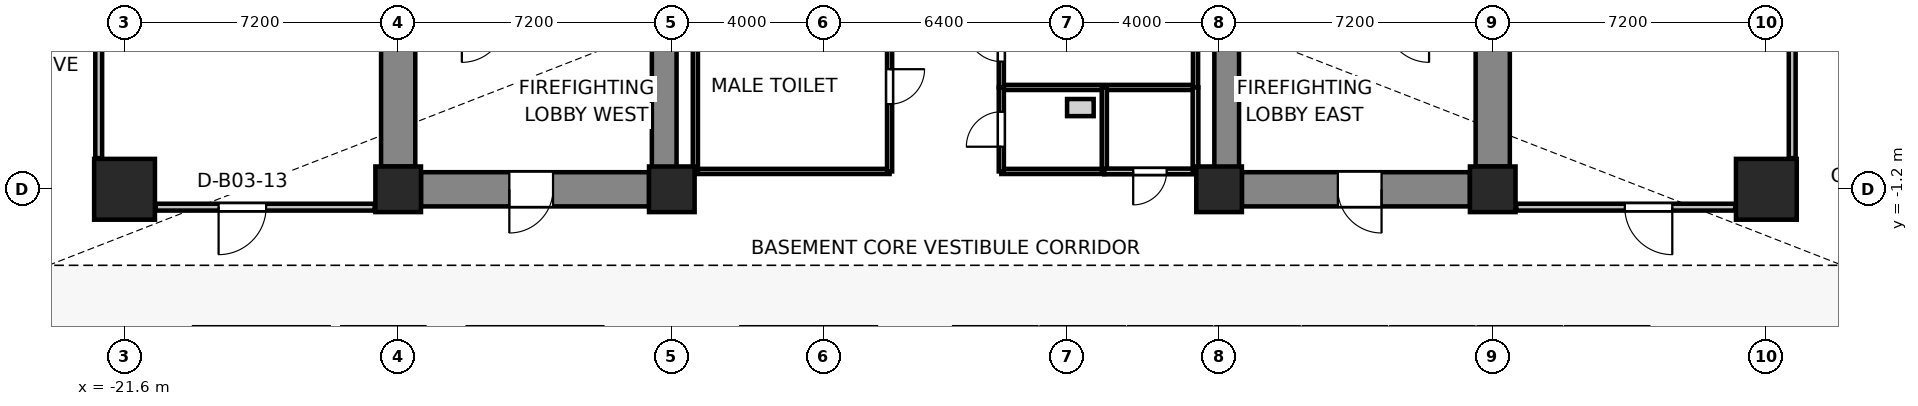
"""IFC4 building model, lengths in metres.
Left out: names, types, materials, properties, quantities, classifications, styles, units other than length and angle.
Written with IfcOpenShell. Run it as: python <this file> out.ifc"""

import sys

from ifc_helpers import new_model, si_unit, direction, frame, frame_2d, origin, origin_2d, place, context, subcontext, project, spatial, rectangle, extrude, source, transform, mapped, element, fill, save


model = new_model("IFC4")
c1 = context("Model", 3, precision=1e-05, world=origin(), true_north=direction((0.0, 1.0)))
c2 = subcontext(c1, "Body", "Model", "MODEL_VIEW")
j1 = project(units=[si_unit("LENGTHUNIT", "METRE"), si_unit("PLANEANGLEUNIT", "RADIAN")], contexts=[c1])
p1 = place(None, origin())
s1 = spatial("IfcSite", under=j1, at=p1, CompositionType="ELEMENT")
p2 = place(p1, origin())
s2 = spatial("IfcBuilding", under=s1, at=p2, CompositionType="ELEMENT")
p3 = place(p2, frame((0.0, 0.0, -13.2)))
s3 = spatial("IfcBuildingStorey", under=s2, at=p3, CompositionType="ELEMENT", Elevation=-13.2)
for number, where, z_axis, x_axis in (
    (1, (-14.4, -1.2, 0.0), (0.0, 0.0, 1.0), (1.0, 0.0, 0.0)),
    (2, (-7.2, -1.2, 0.0), (0.0, 0.0, 1.0), (1.0, 0.0, 0.0)),
    (3, (7.2, -1.2, 0.0), (0.0, 0.0, 1.0), (1.0, 0.0, 0.0)),
    (4, (14.4, -1.2, 0.0), (0.0, 0.0, 1.0), (1.0, 0.0, 0.0)),
):
    element("IfcColumn", number, at=place(p3, frame(where, z_axis=z_axis, x_axis=x_axis)), inside=s3, PredefinedType="COLUMN", context=c2, shape_type="SweptSolid", body=[
        extrude(rectangle(XDim=1.2, YDim=1.2, at=origin_2d()), origin(), (0.0, 0.0, 1.0), 4.4),
    ])
for number, where, z_axis, x_axis in (
    (5, (-21.6, -1.2, 0.0), (0.0, 0.0, 1.0), (1.0, 0.0, 0.0)),
    (6, (21.6, -1.2, 0.0), (0.0, 0.0, 1.0), (1.0, 0.0, 0.0)),
):
    element("IfcColumn", number, at=place(p3, frame(where, z_axis=z_axis, x_axis=x_axis)), inside=s3, PredefinedType="COLUMN", context=c2, shape_type="SweptSolid", body=[
        extrude(rectangle(XDim=1.6, YDim=1.6, at=origin_2d()), origin(), (0.0, 0.0, 1.0), 4.4),
    ])
for number, where, z_axis, x_axis in (
    (7, (-14.4, -0.6, 0.0), (0.0, 0.0, 1.0), (0.0, 1.0, 0.0)),
    (8, (14.4, -0.6, 0.0), (0.0, 0.0, 1.0), (0.0, 1.0, 0.0)),
):
    element("IfcWall", number, at=place(p3, frame(where, z_axis=z_axis, x_axis=x_axis)), inside=s3, PredefinedType="SHEAR", context=c2, shape_type="SweptSolid", body=[
        extrude(rectangle(XDim=6.6, YDim=0.9, at=frame_2d((3.3, 0.0))), origin(), (0.0, 0.0, 1.0), 4.12),
    ])
p4 = place(p3, frame((-7.8, -1.2, 0.0), z_axis=(0.0, 0.0, 1.0), x_axis=(-1.0, 0.0, 0.0)))
e9 = element("IfcWall", 9, at=p4, inside=s3, PredefinedType="SHEAR", context=c2, shape_type="SweptSolid", body=[
    extrude(rectangle(XDim=6.0, YDim=0.9, at=frame_2d((3.0, 0.0))), origin(), (0.0, 0.0, 1.0), 4.12),
])
p5 = place(p4, frame((2.525, 0.0, 0.0)))
e10 = element("IfcOpeningElement", 10, at=p5, cuts=e9, PredefinedType="OPENING", context=c2, shape_type="SweptSolid", body=[
    extrude(rectangle(XDim=1.15, YDim=2.15, at=frame_2d((0.575, 1.075))), frame((0.0, 0.46, 0.0), z_axis=(0.0, -1.0, 0.0), x_axis=(1.0, 0.0, 0.0)), (0.0, 0.0, 1.0), 0.92),
])
p6 = place(p3, frame((13.8, -1.2, 0.0), z_axis=(0.0, 0.0, 1.0), x_axis=(-1.0, 0.0, 0.0)))
e11 = element("IfcWall", 11, at=p6, inside=s3, PredefinedType="SHEAR", context=c2, shape_type="SweptSolid", body=[
    extrude(rectangle(XDim=6.0, YDim=0.9, at=frame_2d((3.0, 0.0))), origin(), (0.0, 0.0, 1.0), 4.12),
])
p7 = place(p6, frame((2.325, 0.0, 0.0)))
e12 = element("IfcOpeningElement", 12, at=p7, cuts=e11, PredefinedType="OPENING", context=c2, shape_type="SweptSolid", body=[
    extrude(rectangle(XDim=1.15, YDim=2.15, at=frame_2d((0.575, 1.075))), frame((0.0, 0.46, 0.0), z_axis=(0.0, -1.0, 0.0), x_axis=(1.0, 0.0, 0.0)), (0.0, 0.0, 1.0), 0.92),
])
for number, where, z_axis, x_axis in (
    (13, (-7.4, -0.75, 0.0), (0.0, 0.0, 1.0), (0.0, 1.0, 0.0)),
    (14, (7.4, -0.75, 0.0), (0.0, 0.0, 1.0), (0.0, 1.0, 0.0)),
):
    element("IfcWall", number, at=place(p3, frame(where, z_axis=z_axis, x_axis=x_axis)), inside=s3, PredefinedType="SHEAR", context=c2, shape_type="SweptSolid", body=[
        extrude(rectangle(XDim=4.0, YDim=0.65, at=frame_2d((2.0, 0.0))), origin(), (0.0, 0.0, 1.0), 4.12),
    ])
p8 = place(p3, frame((-1.47, -0.73, 0.0), z_axis=(0.0, 0.0, 1.0), x_axis=(-1.0, 0.0, 0.0)))
e15 = element("IfcWall", 15, at=p8, inside=s3, PredefinedType="PARTITIONING", context=c2, shape_type="SweptSolid", body=[
    extrude(rectangle(XDim=5.11, YDim=0.135, at=frame_2d((2.555, 0.0))), origin(), (0.0, 0.0, 1.0), 4.12),
])
p9 = place(p3, frame((-6.58, -0.73, 0.0), z_axis=(0.0, 0.0, 1.0), x_axis=(0.0, 1.0, 0.0)))
e16 = element("IfcWall", 16, at=p9, inside=s3, PredefinedType="PARTITIONING", context=c2, shape_type="SweptSolid", body=[
    extrude(rectangle(XDim=4.49, YDim=0.135, at=frame_2d((2.245, 0.0))), origin(), (0.0, 0.0, 1.0), 3.493),
])
p10 = place(p3, frame((-1.47, 3.76, 0.0), z_axis=(0.0, 0.0, 1.0), x_axis=(0.0, -1.0, 0.0)))
e17 = element("IfcWall", 17, at=p10, inside=s3, PredefinedType="PARTITIONING", context=c2, shape_type="SweptSolid", body=[
    extrude(rectangle(XDim=4.49, YDim=0.135, at=frame_2d((2.245, 0.0))), origin(), (0.0, 0.0, 1.0), 3.493),
])
p11 = place(p10, frame((1.8, 0.0, 0.0)))
e18 = element("IfcOpeningElement", 18, at=p11, cuts=e17, PredefinedType="OPENING", context=c2, shape_type="SweptSolid", body=[
    extrude(rectangle(XDim=0.92, YDim=2.1, at=frame_2d((0.46, 1.05))), frame((0.0, 0.077, 0.0), z_axis=(0.0, -1.0, 0.0), x_axis=(1.0, 0.0, 0.0)), (0.0, 0.0, 1.0), 0.155),
])
p12 = place(p3, frame((6.58, 1.48, 0.0), z_axis=(0.0, 0.0, 1.0), x_axis=(-1.0, 0.0, 0.0)))
e19 = element("IfcWall", 19, at=p12, inside=s3, PredefinedType="PARTITIONING", context=c2, shape_type="SweptSolid", body=[
    extrude(rectangle(XDim=5.11, YDim=0.135, at=frame_2d((2.555, 0.0))), origin(), (0.0, 0.0, 1.0), 4.12),
])
p13 = place(p3, frame((1.47, 1.48, 0.0), z_axis=(0.0, 0.0, 1.0), x_axis=(0.0, 1.0, 0.0)))
e20 = element("IfcWall", 20, at=p13, inside=s3, PredefinedType="PARTITIONING", context=c2, shape_type="SweptSolid", body=[
    extrude(rectangle(XDim=2.28, YDim=0.135, at=frame_2d((1.14, 0.0))), origin(), (0.0, 0.0, 1.0), 3.493),
])
p14 = place(p13, frame((0.68, 0.0, 0.0)))
e21 = element("IfcOpeningElement", 21, at=p14, cuts=e20, PredefinedType="OPENING", context=c2, shape_type="SweptSolid", body=[
    extrude(rectangle(XDim=0.92, YDim=2.1, at=frame_2d((0.46, 1.05))), frame((0.0, 0.077, 0.0), z_axis=(0.0, -1.0, 0.0), x_axis=(1.0, 0.0, 0.0)), (0.0, 0.0, 1.0), 0.155),
])
p15 = place(p3, frame((6.58, 3.76, 0.0), z_axis=(0.0, 0.0, 1.0), x_axis=(0.0, -1.0, 0.0)))
e22 = element("IfcWall", 22, at=p15, inside=s3, PredefinedType="PARTITIONING", context=c2, shape_type="SweptSolid", body=[
    extrude(rectangle(XDim=2.28, YDim=0.135, at=frame_2d((1.14, 0.0))), origin(), (0.0, 0.0, 1.0), 3.493),
])
p16 = place(p3, frame((4.18, -0.73, 0.0), z_axis=(0.0, 0.0, 1.0), x_axis=(-1.0, 0.0, 0.0)))
e23 = element("IfcWall", 23, at=p16, inside=s3, PredefinedType="PARTITIONING", context=c2, shape_type="SweptSolid", body=[
    extrude(rectangle(XDim=2.71, YDim=0.135, at=frame_2d((1.355, 0.0))), origin(), (0.0, 0.0, 1.0), 4.12),
])
p17 = place(p3, frame((1.47, -0.73, 0.0), z_axis=(0.0, 0.0, 1.0), x_axis=(0.0, 1.0, 0.0)))
e24 = element("IfcWall", 24, at=p17, inside=s3, PredefinedType="PARTITIONING", context=c2, shape_type="SweptSolid", body=[
    extrude(rectangle(XDim=2.21, YDim=0.135, at=frame_2d((1.105, 0.0))), origin(), (0.0, 0.0, 1.0), 4.12),
])
p18 = place(p17, frame((0.65, 0.0, 0.0)))
e25 = element("IfcOpeningElement", 25, at=p18, cuts=e24, PredefinedType="OPENING", context=c2, shape_type="SweptSolid", body=[
    extrude(rectangle(XDim=0.92, YDim=2.1, at=frame_2d((0.46, 1.05))), frame((0.0, 0.077, 0.0), z_axis=(0.0, -1.0, 0.0), x_axis=(1.0, 0.0, 0.0)), (0.0, 0.0, 1.0), 0.155),
])
p19 = place(p3, frame((4.18, 1.48, 0.0), z_axis=(0.0, 0.0, 1.0), x_axis=(0.0, -1.0, 0.0)))
e26 = element("IfcWall", 26, at=p19, inside=s3, PredefinedType="PARTITIONING", context=c2, shape_type="SweptSolid", body=[
    extrude(rectangle(XDim=2.21, YDim=0.135, at=frame_2d((1.105, 0.0))), origin(), (0.0, 0.0, 1.0), 4.12),
])
p20 = place(p3, frame((6.58, -0.73, 0.0), z_axis=(0.0, 0.0, 1.0), x_axis=(-1.0, 0.0, 0.0)))
e27 = element("IfcWall", 27, at=p20, inside=s3, PredefinedType="PARTITIONING", context=c2, shape_type="SweptSolid", body=[
    extrude(rectangle(XDim=2.4, YDim=0.15, at=frame_2d((1.2, 0.0))), origin(), (0.0, 0.0, 1.0), 4.12),
])
p21 = place(p20, frame((0.76, 0.0, 0.0)))
e28 = element("IfcOpeningElement", 28, at=p21, cuts=e27, PredefinedType="OPENING", context=c2, shape_type="SweptSolid", body=[
    extrude(rectangle(XDim=0.88, YDim=2.1, at=frame_2d((0.44, 1.05))), frame((0.0, 0.085, 0.0), z_axis=(0.0, -1.0, 0.0), x_axis=(1.0, 0.0, 0.0)), (0.0, 0.0, 1.0), 0.17),
])
p22 = place(p3, frame((6.58, 1.48, 0.0), z_axis=(0.0, 0.0, 1.0), x_axis=(0.0, -1.0, 0.0)))
e29 = element("IfcWall", 29, at=p22, inside=s3, PredefinedType="PARTITIONING", context=c2, shape_type="SweptSolid", body=[
    extrude(rectangle(XDim=2.21, YDim=0.15, at=frame_2d((1.105, 0.0))), origin(), (0.0, 0.0, 1.0), 4.12),
])
p23 = place(p3, frame((-15.02, -1.67, 0.0), z_axis=(0.0, 0.0, 1.0), x_axis=(-1.0, 0.0, 0.0)))
e30 = element("IfcWall", 30, at=p23, inside=s3, PredefinedType="PARTITIONING", context=c2, shape_type="SweptSolid", body=[
    extrude(rectangle(XDim=5.76, YDim=0.18, at=frame_2d((2.88, 0.0))), origin(), (0.0, 0.0, 1.0), 4.12),
])
p24 = place(p23, frame((2.855, 0.0, 0.0)))
e31 = element("IfcOpeningElement", 31, at=p24, cuts=e30, PredefinedType="OPENING", context=c2, shape_type="SweptSolid", body=[
    extrude(rectangle(XDim=1.25, YDim=2.15, at=frame_2d((0.625, 1.075))), frame((0.0, 0.1, 0.0), z_axis=(0.0, -1.0, 0.0), x_axis=(1.0, 0.0, 0.0)), (0.0, 0.0, 1.0), 0.2),
])
p25 = place(p3, frame((-22.28, -0.38, 0.0), z_axis=(0.0, 0.0, 1.0), x_axis=(0.0, 1.0, 0.0)))
e32 = element("IfcWall", 32, at=p25, inside=s3, PredefinedType="PARTITIONING", context=c2, shape_type="SweptSolid", body=[
    extrude(rectangle(XDim=4.41, YDim=0.18, at=frame_2d((2.205, 0.0))), origin(), (0.0, 0.0, 1.0), 3.493),
])
p26 = place(p3, frame((20.78, -1.67, 0.0), z_axis=(0.0, 0.0, 1.0), x_axis=(-1.0, 0.0, 0.0)))
e33 = element("IfcWall", 33, at=p26, inside=s3, PredefinedType="PARTITIONING", context=c2, shape_type="SweptSolid", body=[
    extrude(rectangle(XDim=5.76, YDim=0.18, at=frame_2d((2.88, 0.0))), origin(), (0.0, 0.0, 1.0), 4.12),
])
p27 = place(p26, frame((1.655, 0.0, 0.0)))
e34 = element("IfcOpeningElement", 34, at=p27, cuts=e33, PredefinedType="OPENING", context=c2, shape_type="SweptSolid", body=[
    extrude(rectangle(XDim=1.25, YDim=2.15, at=frame_2d((0.625, 1.075))), frame((0.0, 0.1, 0.0), z_axis=(0.0, -1.0, 0.0), x_axis=(1.0, 0.0, 0.0)), (0.0, 0.0, 1.0), 0.2),
])
p28 = place(p3, frame((22.28, 5.78, 0.0), z_axis=(0.0, 0.0, 1.0), x_axis=(0.0, -1.0, 0.0)))
e35 = element("IfcWall", 35, at=p28, inside=s3, PredefinedType="PARTITIONING", context=c2, shape_type="SweptSolid", body=[
    extrude(rectangle(XDim=6.16, YDim=0.18, at=frame_2d((3.08, 0.0))), origin(), (0.0, 0.0, 1.0), 3.493),
])
m1 = source(origin(), c2, "Body", "SweptSolid", [
    extrude(rectangle(XDim=1.15, YDim=2.15, at=frame_2d((0.575, 1.075))), frame((0.0, 0.025, 0.0), z_axis=(0.0, -1.0, 0.0), x_axis=(1.0, 0.0, 0.0)), (0.0, 0.0, 1.0), 0.05),
])
p29 = place(p5, origin())
e36 = element("IfcDoor", 36, at=p29, inside=s3, OperationType="SINGLE_SWING_RIGHT", PredefinedType="DOOR", context=c2, shape_type="MappedRepresentation", body=[
    mapped(m1, transform((0.0, 0.0, 0.0), x_axis=(1.0, 0.0, 0.0), y_axis=(0.0, 1.0, 0.0), z_axis=(0.0, 0.0, 1.0), scale=1.0)),
])
fill(e10, e36)
p30 = place(p7, origin())
e37 = element("IfcDoor", 37, at=p30, inside=s3, OperationType="SINGLE_SWING_LEFT", PredefinedType="DOOR", context=c2, shape_type="MappedRepresentation", body=[
    mapped(m1, transform((0.0, 0.0, 0.0), x_axis=(1.0, 0.0, 0.0), y_axis=(0.0, 1.0, 0.0), z_axis=(0.0, 0.0, 1.0), scale=1.0)),
])
fill(e12, e37)
m2 = source(origin(), c2, "Body", "SweptSolid", [
    extrude(rectangle(XDim=0.92, YDim=2.1, at=frame_2d((0.46, 1.05))), frame((0.0, 0.025, 0.0), z_axis=(0.0, -1.0, 0.0), x_axis=(1.0, 0.0, 0.0)), (0.0, 0.0, 1.0), 0.05),
])
p31 = place(p11, origin())
e38 = element("IfcDoor", 38, at=p31, inside=s3, OperationType="SINGLE_SWING_LEFT", PredefinedType="DOOR", context=c2, shape_type="MappedRepresentation", body=[
    mapped(m2, transform((0.0, 0.0, 0.0), x_axis=(1.0, 0.0, 0.0), y_axis=(0.0, 1.0, 0.0), z_axis=(0.0, 0.0, 1.0), scale=1.0)),
])
fill(e18, e38)
p32 = place(p14, origin())
e39 = element("IfcDoor", 39, at=p32, inside=s3, OperationType="SINGLE_SWING_RIGHT", PredefinedType="DOOR", context=c2, shape_type="MappedRepresentation", body=[
    mapped(m2, transform((0.0, 0.0, 0.0), x_axis=(1.0, 0.0, 0.0), y_axis=(0.0, 1.0, 0.0), z_axis=(0.0, 0.0, 1.0), scale=1.0)),
])
fill(e21, e39)
p33 = place(p18, origin())
e40 = element("IfcDoor", 40, at=p33, inside=s3, OperationType="SINGLE_SWING_LEFT", PredefinedType="DOOR", context=c2, shape_type="MappedRepresentation", body=[
    mapped(m2, transform((0.0, 0.0, 0.0), x_axis=(1.0, 0.0, 0.0), y_axis=(0.0, 1.0, 0.0), z_axis=(0.0, 0.0, 1.0), scale=1.0)),
])
fill(e25, e40)
m3 = source(origin(), c2, "Body", "SweptSolid", [
    extrude(rectangle(XDim=0.88, YDim=2.1, at=frame_2d((0.44, 1.05))), frame((0.0, 0.025, 0.0), z_axis=(0.0, -1.0, 0.0), x_axis=(1.0, 0.0, 0.0)), (0.0, 0.0, 1.0), 0.05),
])
p34 = place(p21, origin())
e41 = element("IfcDoor", 41, at=p34, inside=s3, OperationType="SINGLE_SWING_RIGHT", PredefinedType="DOOR", context=c2, shape_type="MappedRepresentation", body=[
    mapped(m3, transform((0.0, 0.0, 0.0), x_axis=(1.0, 0.0, 0.0), y_axis=(0.0, 1.0, 0.0), z_axis=(0.0, 0.0, 1.0), scale=1.0)),
])
fill(e28, e41)
m4 = source(origin(), c2, "Body", "SweptSolid", [
    extrude(rectangle(XDim=1.25, YDim=2.15, at=frame_2d((0.625, 1.075))), frame((0.0, 0.025, 0.0), z_axis=(0.0, -1.0, 0.0), x_axis=(1.0, 0.0, 0.0)), (0.0, 0.0, 1.0), 0.05),
])
p35 = place(p24, origin())
e42 = element("IfcDoor", 42, at=p35, inside=s3, OperationType="SINGLE_SWING_RIGHT", PredefinedType="DOOR", context=c2, shape_type="MappedRepresentation", body=[
    mapped(m4, transform((0.0, 0.0, 0.0), x_axis=(1.0, 0.0, 0.0), y_axis=(0.0, 1.0, 0.0), z_axis=(0.0, 0.0, 1.0), scale=1.0)),
])
fill(e31, e42)
p36 = place(p27, origin())
e43 = element("IfcDoor", 43, at=p36, inside=s3, OperationType="SINGLE_SWING_LEFT", PredefinedType="DOOR", context=c2, shape_type="MappedRepresentation", body=[
    mapped(m4, transform((0.0, 0.0, 0.0), x_axis=(1.0, 0.0, 0.0), y_axis=(0.0, 1.0, 0.0), z_axis=(0.0, 0.0, 1.0), scale=1.0)),
])
fill(e34, e43)
save(model, sys.argv[1])
